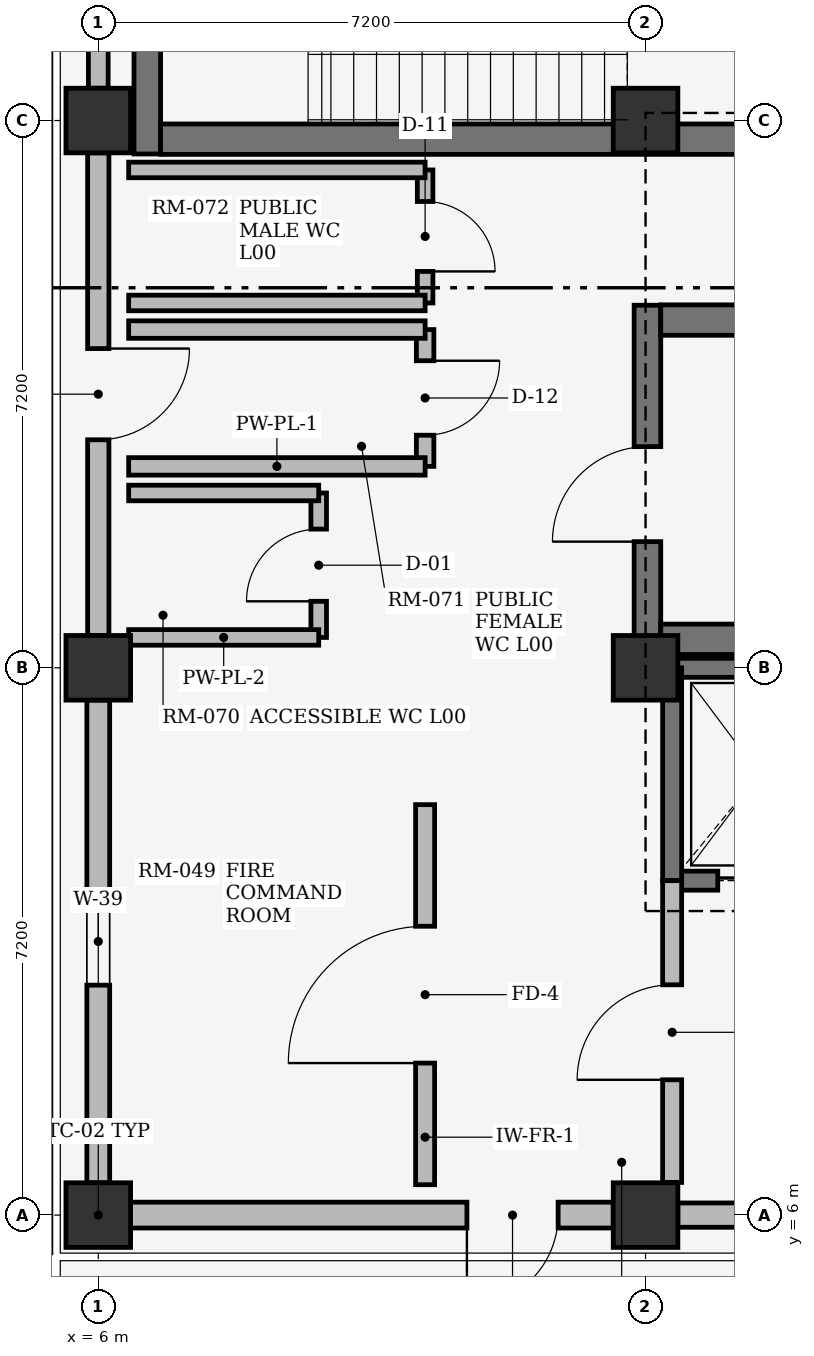
"""IFC4 building model, lengths in metres.
Left out: names, types, materials, properties, quantities, classifications, styles, units other than length and angle.
Written with IfcOpenShell. Run it as: python <this file> out.ifc"""

import sys

from ifc_helpers import new_model, si_unit, direction, frame, frame_2d, origin, origin_2d, place, context, subcontext, project, spatial, rectangle, extrude, element, fill, save


model = new_model("IFC4")
c1 = context("Model", 3, precision=1e-05, world=origin(), true_north=direction((0.0, 1.0)))
c2 = subcontext(c1, "Body", "Model", "MODEL_VIEW")
j1 = project(units=[si_unit("LENGTHUNIT", "METRE"), si_unit("PLANEANGLEUNIT", "RADIAN")], contexts=[c1])
p1 = place(None, origin())
s1 = spatial("IfcSite", under=j1, at=p1, CompositionType="ELEMENT")
p2 = place(p1, origin())
s2 = spatial("IfcBuilding", under=s1, at=p2, CompositionType="ELEMENT")
p3 = place(p2, origin())
s3 = spatial("IfcBuildingStorey", under=s2, at=p3, CompositionType="ELEMENT", Elevation=0.0)
for number, where, z_axis, x_axis in (
    (1, (6.0, 6.0, 0.0), (0.0, 0.0, 1.0), (1.0, 0.0, 0.0)),
    (2, (6.0, 13.2, 0.0), (0.0, 0.0, 1.0), (1.0, 0.0, 0.0)),
    (3, (6.0, 20.4, 0.0), (0.0, 0.0, 1.0), (1.0, 0.0, 0.0)),
    (4, (13.2, 6.0, 0.0), (0.0, 0.0, 1.0), (1.0, 0.0, 0.0)),
    (5, (13.2, 13.2, 0.0), (0.0, 0.0, 1.0), (1.0, 0.0, 0.0)),
    (6, (13.2, 20.4, 0.0), (0.0, 0.0, 1.0), (1.0, 0.0, 0.0)),
):
    element("IfcColumn", number, at=place(p3, frame(where, z_axis=z_axis, x_axis=x_axis)), inside=s3, PredefinedType="COLUMN", context=c2, shape_type="SweptSolid", body=[
        extrude(rectangle(XDim=0.85, YDim=0.85, at=origin_2d()), origin(), (0.0, 0.0, 1.0), 4.48),
    ])
p4 = place(p3, frame((6.425, 6.0, 0.0), z_axis=(0.0, 0.0, 1.0), x_axis=(1.0, 0.0, 0.0)))
e7 = element("IfcWall", 7, at=p4, inside=s3, PredefinedType="STANDARD", context=c2, shape_type="SweptSolid", body=[
    extrude(rectangle(XDim=6.35, YDim=0.34, at=frame_2d((3.175, 0.0))), origin(), (0.0, 0.0, 1.0), 3.66),
])
p5 = place(p4, frame((4.425, 0.0, 0.0)))
e8 = element("IfcOpeningElement", 8, at=p5, cuts=e7, PredefinedType="OPENING", context=c2, shape_type="SweptSolid", body=[
    extrude(rectangle(XDim=1.2, YDim=2.15, at=frame_2d((0.6, 1.075))), frame((0.0, 0.18, 0.0), z_axis=(0.0, -1.0, 0.0), x_axis=(1.0, 0.0, 0.0)), (0.0, 0.0, 1.0), 0.36),
])
p6 = place(p3, frame((13.625, 6.0, 0.0), z_axis=(0.0, 0.0, 1.0), x_axis=(1.0, 0.0, 0.0)))
e9 = element("IfcWall", 9, at=p6, inside=s3, PredefinedType="STANDARD", context=c2, shape_type="SweptSolid", body=[
    extrude(rectangle(XDim=6.35, YDim=0.32, at=frame_2d((3.175, 0.0))), origin(), (0.0, 0.0, 1.0), 3.66),
])
p7 = place(p6, frame((2.075, 0.0, 0.0)))
e10 = element("IfcOpeningElement", 10, at=p7, cuts=e9, PredefinedType="OPENING", context=c2, shape_type="SweptSolid", body=[
    extrude(rectangle(XDim=2.2, YDim=2.4, at=frame_2d((1.1, 1.2))), frame((0.0, 0.17, 0.0), z_axis=(0.0, -1.0, 0.0), x_axis=(1.0, 0.0, 0.0)), (0.0, 0.0, 1.0), 0.34),
])
p8 = place(p3, frame((6.0, 6.425, 0.0), z_axis=(0.0, 0.0, 1.0), x_axis=(0.0, 1.0, 0.0)))
e11 = element("IfcWall", 11, at=p8, inside=s3, PredefinedType="STANDARD", context=c2, shape_type="SweptSolid", body=[
    extrude(rectangle(XDim=6.35, YDim=0.3, at=frame_2d((3.175, 0.0))), origin(), (0.0, 0.0, 1.0), 3.66),
])
p9 = place(p8, frame((2.6, 0.0, 0.75)))
e12 = element("IfcOpeningElement", 12, at=p9, cuts=e11, PredefinedType="OPENING", context=c2, shape_type="SweptSolid", body=[
    extrude(rectangle(XDim=1.15, YDim=1.5, at=frame_2d((0.575, 0.75))), frame((0.0, 0.16, 0.0), z_axis=(0.0, -1.0, 0.0), x_axis=(1.0, 0.0, 0.0)), (0.0, 0.0, 1.0), 0.32),
])
p10 = place(p3, frame((6.0, 13.625, 0.0), z_axis=(0.0, 0.0, 1.0), x_axis=(0.0, 1.0, 0.0)))
e13 = element("IfcWall", 13, at=p10, inside=s3, PredefinedType="STANDARD", context=c2, shape_type="SweptSolid", body=[
    extrude(rectangle(XDim=6.35, YDim=0.28, at=frame_2d((3.175, 0.0))), origin(), (0.0, 0.0, 1.0), 3.66),
])
p11 = place(p10, frame((2.575, 0.0, 0.0)))
e14 = element("IfcOpeningElement", 14, at=p11, cuts=e13, PredefinedType="OPENING", context=c2, shape_type="SweptSolid", body=[
    extrude(rectangle(XDim=1.2, YDim=2.15, at=frame_2d((0.6, 1.075))), frame((0.0, 0.15, 0.0), z_axis=(0.0, -1.0, 0.0), x_axis=(1.0, 0.0, 0.0)), (0.0, 0.0, 1.0), 0.3),
])
p12 = place(p3, frame((6.0, 20.825, 0.0), z_axis=(0.0, 0.0, 1.0), x_axis=(0.0, 1.0, 0.0)))
e15 = element("IfcWall", 15, at=p12, inside=s3, PredefinedType="STANDARD", context=c2, shape_type="SweptSolid", body=[
    extrude(rectangle(XDim=6.35, YDim=0.26, at=frame_2d((3.175, 0.0))), origin(), (0.0, 0.0, 1.0), 3.66),
])
p13 = place(p12, frame((4.175, 0.0, 0.0)))
e16 = element("IfcOpeningElement", 16, at=p13, cuts=e15, PredefinedType="OPENING", context=c2, shape_type="SweptSolid", body=[
    extrude(rectangle(XDim=1.2, YDim=2.15, at=frame_2d((0.6, 1.075))), frame((0.0, 0.14, 0.0), z_axis=(0.0, -1.0, 0.0), x_axis=(1.0, 0.0, 0.0)), (0.0, 0.0, 1.0), 0.28),
])
p14 = place(p3, frame((13.225, 13.0, 0.0), z_axis=(0.0, 0.0, 1.0), x_axis=(0.0, 1.0, 0.0)))
e17 = element("IfcWall", 17, at=p14, inside=s3, PredefinedType="SHEAR", context=c2, shape_type="SweptSolid", body=[
    extrude(rectangle(XDim=4.97, YDim=0.35, at=frame_2d((2.485, 0.0))), origin(), (0.0, 0.0, 1.0), 4.48),
])
p15 = place(p14, frame((1.86, 0.0, 0.0)))
e18 = element("IfcOpeningElement", 18, at=p15, cuts=e17, PredefinedType="OPENING", context=c2, shape_type="SweptSolid", body=[
    extrude(rectangle(XDim=1.25, YDim=2.2, at=frame_2d((0.625, 1.1))), frame((0.0, 0.185, 0.0), z_axis=(0.0, -1.0, 0.0), x_axis=(1.0, 0.0, 0.0)), (0.0, 0.0, 1.0), 0.37),
])
for number, where, z_axis, x_axis in (
    (19, (13.4, 13.575, 0.0), (0.0, 0.0, 1.0), (1.0, 0.0, 0.0)),
    (20, (13.4, 17.775, 0.0), (0.0, 0.0, 1.0), (1.0, 0.0, 0.0)),
):
    element("IfcWall", number, at=place(p3, frame(where, z_axis=z_axis, x_axis=x_axis)), inside=s3, PredefinedType="SHEAR", context=c2, shape_type="SweptSolid", body=[
        extrude(rectangle(XDim=7.98, YDim=0.4, at=frame_2d((3.99, 0.0))), origin(), (0.0, 0.0, 1.0), 4.48),
    ])
p16 = place(p3, frame((6.645, 24.55, 0.0), z_axis=(0.0, 0.0, 1.0), x_axis=(0.0, -1.0, 0.0)))
e21 = element("IfcWall", 21, at=p16, inside=s3, PredefinedType="SHEAR", context=c2, shape_type="SweptSolid", body=[
    extrude(rectangle(XDim=4.59, YDim=0.35, at=frame_2d((2.295, 0.0))), origin(), (0.0, 0.0, 1.0), 4.48),
])
p17 = place(p3, frame((14.8, 20.155, 0.0), z_axis=(0.0, 0.0, 1.0), x_axis=(-1.0, 0.0, 0.0)))
e22 = element("IfcWall", 22, at=p17, inside=s3, PredefinedType="SHEAR", context=c2, shape_type="SweptSolid", body=[
    extrude(rectangle(XDim=7.98, YDim=0.4, at=frame_2d((3.99, 0.0))), origin(), (0.0, 0.0, 1.0), 4.48),
])
p18 = place(p3, frame((13.55, 10.4, 0.0), z_axis=(0.0, 0.0, 1.0), x_axis=(1.0, 0.0, 0.0)))
e23 = element("IfcWall", 23, at=p18, inside=s3, PredefinedType="SHEAR", context=c2, shape_type="SweptSolid", body=[
    extrude(rectangle(XDim=2.3, YDim=0.25, at=frame_2d((1.15, 0.0))), origin(), (0.0, 0.0, 1.0), 4.48),
])
p19 = place(p18, frame((0.6, 0.0, 0.0)))
e24 = element("IfcOpeningElement", 24, at=p19, cuts=e23, PredefinedType="OPENING", context=c2, shape_type="SweptSolid", body=[
    extrude(rectangle(XDim=1.1, YDim=2.2, at=frame_2d((0.55, 1.1))), frame((0.0, 0.135, 0.0), z_axis=(0.0, -1.0, 0.0), x_axis=(1.0, 0.0, 0.0)), (0.0, 0.0, 1.0), 0.27),
])
p20 = place(p3, frame((13.55, 13.2, 0.0), z_axis=(0.0, 0.0, 1.0), x_axis=(1.0, 0.0, 0.0)))
e25 = element("IfcWall", 25, at=p20, inside=s3, PredefinedType="SHEAR", context=c2, shape_type="SweptSolid", body=[
    extrude(rectangle(XDim=2.3, YDim=0.25, at=frame_2d((1.15, 0.0))), origin(), (0.0, 0.0, 1.0), 4.48),
])
p21 = place(p3, frame((13.55, 10.4, 0.0), z_axis=(0.0, 0.0, 1.0), x_axis=(0.0, 1.0, 0.0)))
e26 = element("IfcWall", 26, at=p21, inside=s3, PredefinedType="SHEAR", context=c2, shape_type="SweptSolid", body=[
    extrude(rectangle(XDim=2.8, YDim=0.25, at=frame_2d((1.4, 0.0))), origin(), (0.0, 0.0, 1.0), 4.48),
])
p22 = place(p3, frame((8.9, 13.6, 0.0), z_axis=(0.0, 0.0, 1.0), x_axis=(0.0, 1.0, 0.0)))
e27 = element("IfcWall", 27, at=p22, inside=s3, PredefinedType="PLUMBINGWALL", context=c2, shape_type="SweptSolid", body=[
    extrude(rectangle(XDim=1.9, YDim=0.205, at=frame_2d((0.95, 0.0))), origin(), (0.0, 0.0, 1.0), 4.46),
])
p23 = place(p22, frame((0.475, 0.0, 0.0)))
e28 = element("IfcOpeningElement", 28, at=p23, cuts=e27, PredefinedType="OPENING", context=c2, shape_type="SweptSolid", body=[
    extrude(rectangle(XDim=0.95, YDim=2.15, at=frame_2d((0.475, 1.075))), frame((0.0, 0.113, 0.0), z_axis=(0.0, -1.0, 0.0), x_axis=(1.0, 0.0, 0.0)), (0.0, 0.0, 1.0), 0.225),
])
for number, where, z_axis, x_axis in (
    (29, (6.4, 13.6, 0.0), (0.0, 0.0, 1.0), (1.0, 0.0, 0.0)),
    (30, (6.4, 15.5, 0.0), (0.0, 0.0, 1.0), (1.0, 0.0, 0.0)),
):
    element("IfcWall", number, at=place(p3, frame(where, z_axis=z_axis, x_axis=x_axis)), inside=s3, PredefinedType="PLUMBINGWALL", context=c2, shape_type="SweptSolid", body=[
        extrude(rectangle(XDim=2.5, YDim=0.205, at=frame_2d((1.25, 0.0))), origin(), (0.0, 0.0, 1.0), 4.46),
    ])
p24 = place(p3, frame((10.3, 15.85, 0.0), z_axis=(0.0, 0.0, 1.0), x_axis=(0.0, 1.0, 0.0)))
e31 = element("IfcWall", 31, at=p24, inside=s3, PredefinedType="PLUMBINGWALL", context=c2, shape_type="SweptSolid", body=[
    extrude(rectangle(XDim=1.8, YDim=0.23, at=frame_2d((0.9, 0.0))), origin(), (0.0, 0.0, 1.0), 4.46),
])
p25 = place(p24, frame((0.41, 0.0, 0.0)))
e32 = element("IfcOpeningElement", 32, at=p25, cuts=e31, PredefinedType="OPENING", context=c2, shape_type="SweptSolid", body=[
    extrude(rectangle(XDim=0.98, YDim=2.1, at=frame_2d((0.49, 1.05))), frame((0.0, 0.125, 0.0), z_axis=(0.0, -1.0, 0.0), x_axis=(1.0, 0.0, 0.0)), (0.0, 0.0, 1.0), 0.25),
])
for number, where, z_axis, x_axis in (
    (33, (6.4, 15.85, 0.0), (0.0, 0.0, 1.0), (1.0, 0.0, 0.0)),
    (34, (6.4, 17.65, 0.0), (0.0, 0.0, 1.0), (1.0, 0.0, 0.0)),
):
    element("IfcWall", number, at=place(p3, frame(where, z_axis=z_axis, x_axis=x_axis)), inside=s3, PredefinedType="PLUMBINGWALL", context=c2, shape_type="SweptSolid", body=[
        extrude(rectangle(XDim=3.9, YDim=0.23, at=frame_2d((1.95, 0.0))), origin(), (0.0, 0.0, 1.0), 4.46),
    ])
p26 = place(p3, frame((10.3, 18.0, 0.0), z_axis=(0.0, 0.0, 1.0), x_axis=(0.0, 1.0, 0.0)))
e35 = element("IfcWall", 35, at=p26, inside=s3, PredefinedType="PLUMBINGWALL", context=c2, shape_type="SweptSolid", body=[
    extrude(rectangle(XDim=1.75, YDim=0.205, at=frame_2d((0.875, 0.0))), origin(), (0.0, 0.0, 1.0), 4.46),
])
p27 = place(p26, frame((0.415, 0.0, 0.0)))
e36 = element("IfcOpeningElement", 36, at=p27, cuts=e35, PredefinedType="OPENING", context=c2, shape_type="SweptSolid", body=[
    extrude(rectangle(XDim=0.92, YDim=2.1, at=frame_2d((0.46, 1.05))), frame((0.0, 0.113, 0.0), z_axis=(0.0, -1.0, 0.0), x_axis=(1.0, 0.0, 0.0)), (0.0, 0.0, 1.0), 0.225),
])
for number, where, z_axis, x_axis in (
    (37, (6.4, 18.0, 0.0), (0.0, 0.0, 1.0), (1.0, 0.0, 0.0)),
    (38, (6.4, 19.75, 0.0), (0.0, 0.0, 1.0), (1.0, 0.0, 0.0)),
):
    element("IfcWall", number, at=place(p3, frame(where, z_axis=z_axis, x_axis=x_axis)), inside=s3, PredefinedType="PLUMBINGWALL", context=c2, shape_type="SweptSolid", body=[
        extrude(rectangle(XDim=3.9, YDim=0.205, at=frame_2d((1.95, 0.0))), origin(), (0.0, 0.0, 1.0), 4.46),
    ])
p28 = place(p3, frame((10.3, 6.4, 0.0), z_axis=(0.0, 0.0, 1.0), x_axis=(0.0, 1.0, 0.0)))
e39 = element("IfcWall", 39, at=p28, inside=s3, PredefinedType="SOLIDWALL", context=c2, shape_type="SweptSolid", body=[
    extrude(rectangle(XDim=5.0, YDim=0.25, at=frame_2d((2.5, 0.0))), origin(), (0.0, 0.0, 1.0), 4.46),
])
p29 = place(p28, frame((1.6, 0.0, 0.0)))
e40 = element("IfcOpeningElement", 40, at=p29, cuts=e39, PredefinedType="OPENING", context=c2, shape_type="SweptSolid", body=[
    extrude(rectangle(XDim=1.8, YDim=2.25, at=frame_2d((0.9, 1.125))), frame((0.0, 0.135, 0.0), z_axis=(0.0, -1.0, 0.0), x_axis=(1.0, 0.0, 0.0)), (0.0, 0.0, 1.0), 0.27),
])
p30 = place(p3, frame((13.55, 6.43, 0.0), z_axis=(0.0, 0.0, 1.0), x_axis=(0.0, 1.0, 0.0)))
e41 = element("IfcWall", 41, at=p30, inside=s3, PredefinedType="SOLIDWALL", context=c2, shape_type="SweptSolid", body=[
    extrude(rectangle(XDim=3.97, YDim=0.25, at=frame_2d((1.985, 0.0))), origin(), (0.0, 0.0, 1.0), 4.46),
])
p31 = place(p30, frame((1.35, 0.0, 0.0)))
e42 = element("IfcOpeningElement", 42, at=p31, cuts=e41, PredefinedType="OPENING", context=c2, shape_type="SweptSolid", body=[
    extrude(rectangle(XDim=1.25, YDim=2.2, at=frame_2d((0.625, 1.1))), frame((0.0, 0.135, 0.0), z_axis=(0.0, -1.0, 0.0), x_axis=(1.0, 0.0, 0.0)), (0.0, 0.0, 1.0), 0.27),
])
p32 = place(p5, frame((1.2, 0.0, 0.0), z_axis=(0.0, 0.0, 1.0), x_axis=(-1.0, 0.0, 0.0)))
e43 = element("IfcDoor", 43, at=p32, inside=s3, OperationType="SINGLE_SWING_LEFT", PredefinedType="DOOR", context=c2, shape_type="SweptSolid", body=[
    extrude(rectangle(XDim=1.2, YDim=2.15, at=frame_2d((0.6, 1.075))), frame((0.0, 0.025, 0.0), z_axis=(0.0, -1.0, 0.0), x_axis=(1.0, 0.0, 0.0)), (0.0, 0.0, 1.0), 0.05),
])
fill(e8, e43)
p33 = place(p9, origin())
e44 = element("IfcWindow", 44, at=p33, inside=s3, PartitioningType="SINGLE_PANEL", PredefinedType="WINDOW", context=c2, shape_type="SweptSolid", body=[
    extrude(rectangle(XDim=1.15, YDim=1.5, at=frame_2d((0.575, 0.75))), frame((0.0, 0.03, 0.0), z_axis=(0.0, -1.0, 0.0), x_axis=(1.0, 0.0, 0.0)), (0.0, 0.0, 1.0), 0.06),
])
fill(e12, e44)
p34 = place(p11, origin())
e45 = element("IfcDoor", 45, at=p34, inside=s3, OperationType="SINGLE_SWING_RIGHT", PredefinedType="DOOR", context=c2, shape_type="SweptSolid", body=[
    extrude(rectangle(XDim=1.2, YDim=2.15, at=frame_2d((0.6, 1.075))), frame((0.0, 0.025, 0.0), z_axis=(0.0, -1.0, 0.0), x_axis=(1.0, 0.0, 0.0)), (0.0, 0.0, 1.0), 0.05),
])
fill(e14, e45)
p35 = place(p15, origin())
e46 = element("IfcDoor", 46, at=p35, inside=s3, OperationType="SINGLE_SWING_LEFT", PredefinedType="DOOR", context=c2, shape_type="SweptSolid", body=[
    extrude(rectangle(XDim=1.25, YDim=2.2, at=frame_2d((0.625, 1.1))), frame((0.0, 0.025, 0.0), z_axis=(0.0, -1.0, 0.0), x_axis=(1.0, 0.0, 0.0)), (0.0, 0.0, 1.0), 0.05),
])
fill(e18, e46)
p36 = place(p19, origin())
e47 = element("IfcDoor", 47, at=p36, inside=s3, OperationType="DOUBLE_DOOR_SLIDING", PredefinedType="DOOR", context=c2, shape_type="SweptSolid", body=[
    extrude(rectangle(XDim=1.1, YDim=2.2, at=frame_2d((0.55, 1.1))), frame((0.0, 0.025, 0.0), z_axis=(0.0, -1.0, 0.0), x_axis=(1.0, 0.0, 0.0)), (0.0, 0.0, 1.0), 0.05),
])
fill(e24, e47)
p37 = place(p23, origin())
e48 = element("IfcDoor", 48, at=p37, inside=s3, OperationType="SINGLE_SWING_LEFT", PredefinedType="DOOR", context=c2, shape_type="SweptSolid", body=[
    extrude(rectangle(XDim=0.95, YDim=2.15, at=frame_2d((0.475, 1.075))), frame((0.0, 0.025, 0.0), z_axis=(0.0, -1.0, 0.0), x_axis=(1.0, 0.0, 0.0)), (0.0, 0.0, 1.0), 0.05),
])
fill(e28, e48)
p38 = place(p25, origin())
e49 = element("IfcDoor", 49, at=p38, inside=s3, OperationType="SINGLE_SWING_RIGHT", PredefinedType="DOOR", context=c2, shape_type="SweptSolid", body=[
    extrude(rectangle(XDim=0.98, YDim=2.1, at=frame_2d((0.49, 1.05))), frame((0.0, 0.025, 0.0), z_axis=(0.0, -1.0, 0.0), x_axis=(1.0, 0.0, 0.0)), (0.0, 0.0, 1.0), 0.05),
])
fill(e32, e49)
p39 = place(p27, frame((0.92, 0.0, 0.0), z_axis=(0.0, 0.0, 1.0), x_axis=(-1.0, 0.0, 0.0)))
e50 = element("IfcDoor", 50, at=p39, inside=s3, OperationType="SINGLE_SWING_LEFT", PredefinedType="DOOR", context=c2, shape_type="SweptSolid", body=[
    extrude(rectangle(XDim=0.92, YDim=2.1, at=frame_2d((0.46, 1.05))), frame((0.0, 0.025, 0.0), z_axis=(0.0, -1.0, 0.0), x_axis=(1.0, 0.0, 0.0)), (0.0, 0.0, 1.0), 0.05),
])
fill(e36, e50)
p40 = place(p29, origin())
e51 = element("IfcDoor", 51, at=p40, inside=s3, OperationType="DOUBLE_DOOR_SINGLE_SWING", PredefinedType="DOOR", context=c2, shape_type="SweptSolid", body=[
    extrude(rectangle(XDim=1.8, YDim=2.25, at=frame_2d((0.9, 1.125))), frame((0.0, 0.025, 0.0), z_axis=(0.0, -1.0, 0.0), x_axis=(1.0, 0.0, 0.0)), (0.0, 0.0, 1.0), 0.05),
])
fill(e40, e51)
p41 = place(p31, origin())
e52 = element("IfcDoor", 52, at=p41, inside=s3, OperationType="SINGLE_SWING_LEFT", PredefinedType="DOOR", context=c2, shape_type="SweptSolid", body=[
    extrude(rectangle(XDim=1.25, YDim=2.2, at=frame_2d((0.625, 1.1))), frame((0.0, 0.025, 0.0), z_axis=(0.0, -1.0, 0.0), x_axis=(1.0, 0.0, 0.0)), (0.0, 0.0, 1.0), 0.05),
])
fill(e42, e52)
save(model, sys.argv[1])
